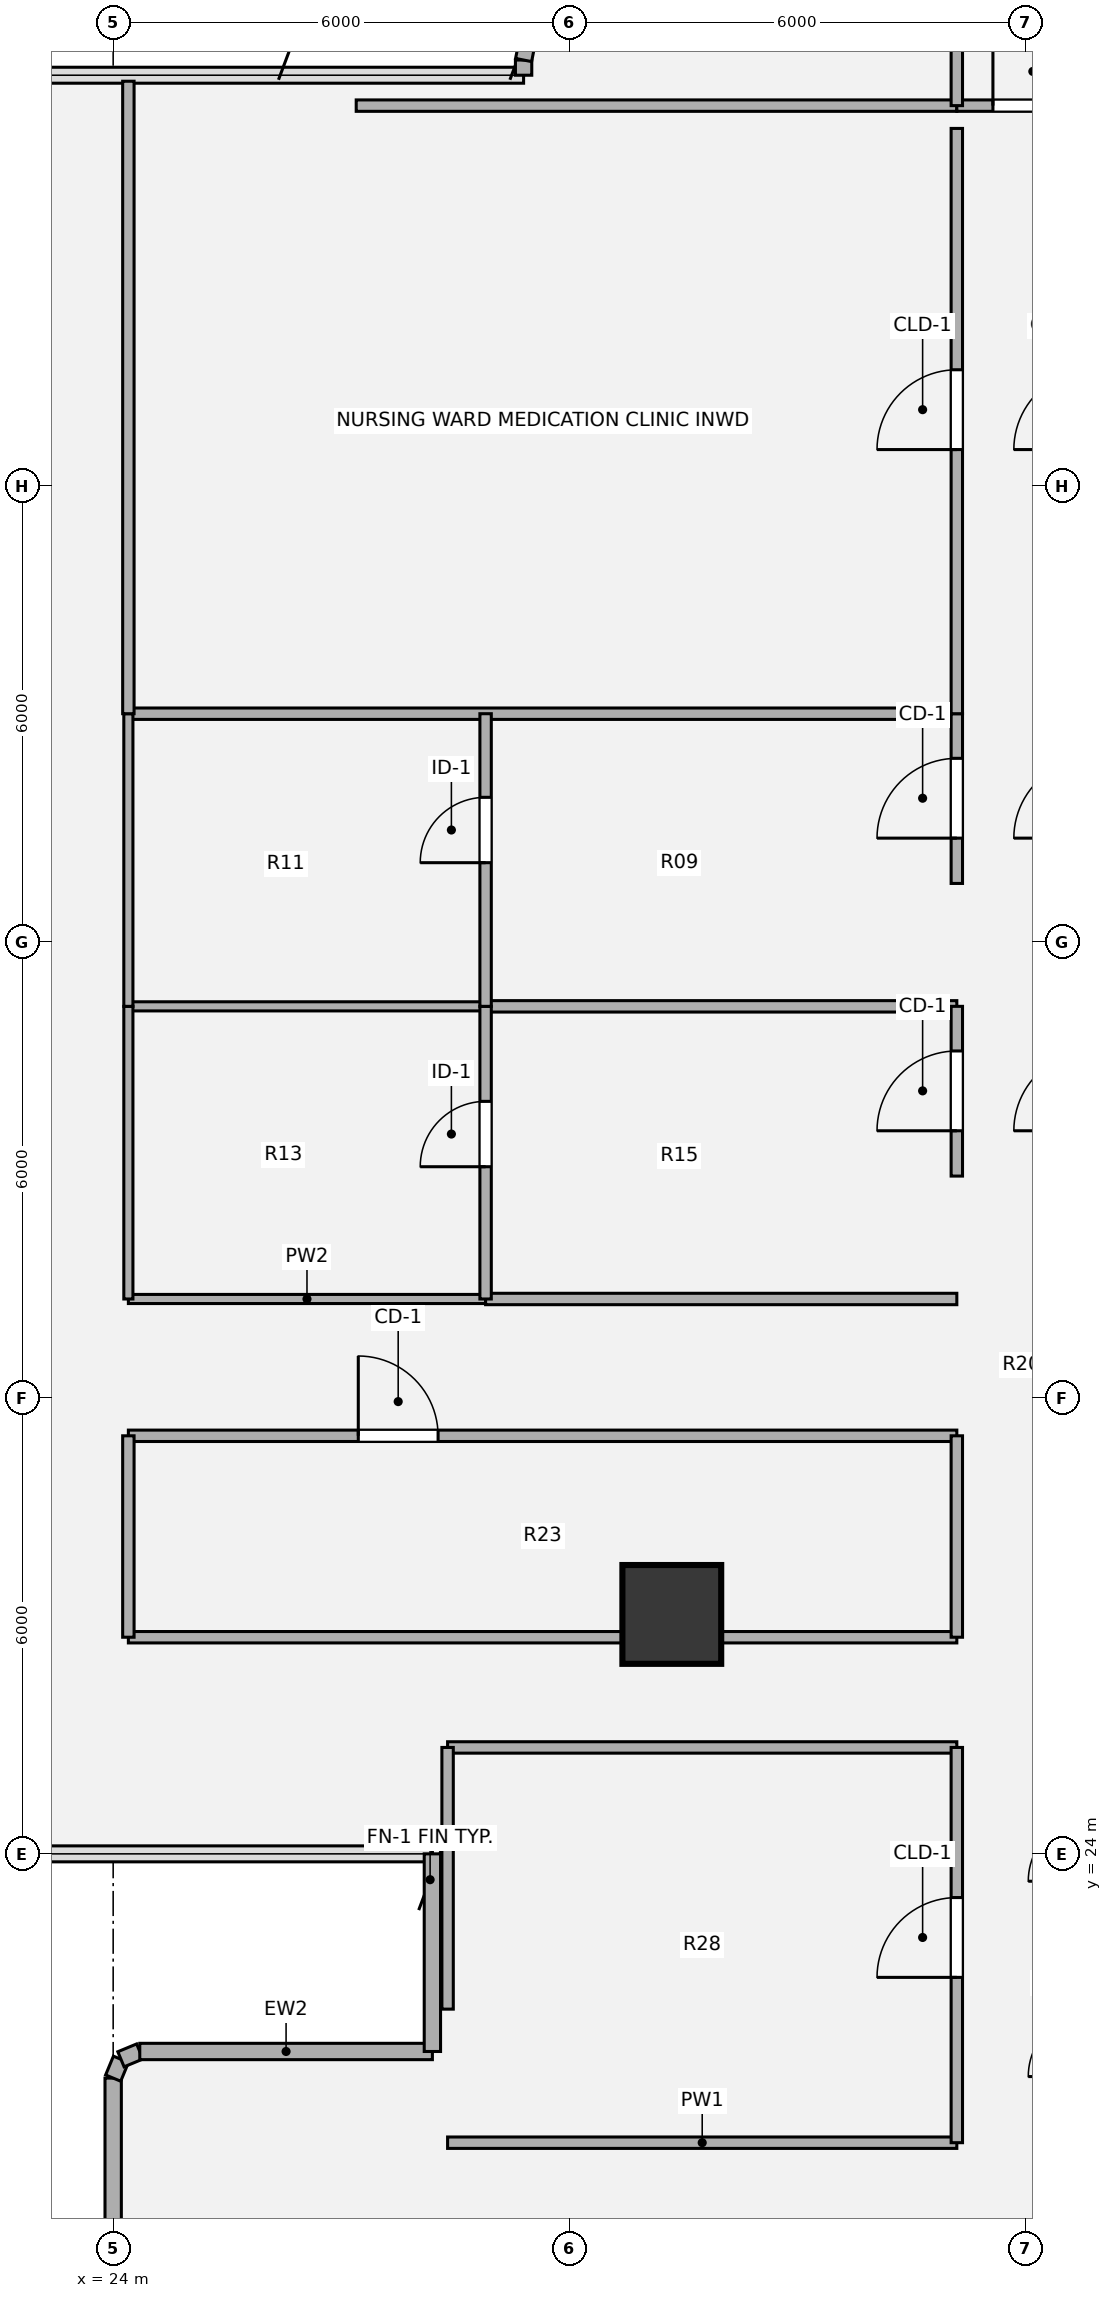
"""IFC4 building model, lengths in metres.
Left out: names, types, materials, properties, quantities, classifications, styles, units other than length and angle.
Written with IfcOpenShell. Run it as: python <this file> out.ifc"""

import sys

from ifc_helpers import new_model, si_unit, direction, frame, frame_2d, origin, origin_2d, place, context, subcontext, project, spatial, rectangle, hollow_circle, extrude, source, transform, mapped, element, fill, save


model = new_model("IFC4")
c1 = context("Model", 3, precision=1e-05, world=origin(), true_north=direction((0.0, 1.0)))
c2 = subcontext(c1, "Body", "Model", "MODEL_VIEW")
j1 = project(units=[si_unit("LENGTHUNIT", "METRE"), si_unit("PLANEANGLEUNIT", "RADIAN")], contexts=[c1])
p1 = place(None, origin())
s1 = spatial("IfcSite", under=j1, at=p1, CompositionType="ELEMENT")
p2 = place(p1, origin())
s2 = spatial("IfcBuilding", under=s1, at=p2, CompositionType="ELEMENT")
p3 = place(p2, frame((0.0, 0.0, 127.62)))
s3 = spatial("IfcBuildingStorey", under=s2, at=p3, CompositionType="ELEMENT", Elevation=127.62)
m1 = source(origin(), c2, "Body", "SweptSolid", [
    extrude(hollow_circle(Radius=0.65, WallThickness=0.045, at=origin_2d()), origin(), (0.0, 0.0, 1.0), 3.78),
])
p4 = place(p3, frame((31.35, 27.15, 0.0), z_axis=(0.0, 0.0, 1.0), x_axis=(1.0, 0.0, 0.0)))
e1 = element("IfcColumn", 1, at=p4, inside=s3, PredefinedType="COLUMN", context=c2, shape_type="MappedRepresentation", body=[
    mapped(m1, transform((0.0, 0.0, 0.0), x_axis=(1.0, 0.0, 0.0), y_axis=(0.0, 1.0, 0.0), z_axis=(0.0, 0.0, 1.0), scale=1.0)),
])
p5 = place(p3, frame((24.0, 18.43, 0.0), z_axis=(0.0, 0.0, 1.0), x_axis=(0.0, 1.0, 0.0)))
e2 = element("IfcWall", 2, at=p5, inside=s3, PredefinedType="SOLIDWALL", context=c2, shape_type="SweptSolid", body=[
    extrude(rectangle(XDim=2.62, YDim=0.215, at=frame_2d((1.31, 0.0))), origin(), (0.0, 0.0, 1.0), 3.53),
])
p6 = place(p3, frame((24.0, 21.05, 0.0), z_axis=(0.0, 0.0, 1.0), x_axis=(0.382673670509, 0.923883575944, 0.0)))
e3 = element("IfcWall", 3, at=p6, inside=s3, PredefinedType="SOLIDWALL", context=c2, shape_type="SweptSolid", body=[
    extrude(rectangle(XDim=0.268, YDim=0.215, at=frame_2d((0.134, 0.0))), origin(), (0.0, 0.0, 1.0), 3.53),
])
p7 = place(p3, frame((24.103, 21.298, 0.0), z_axis=(0.0, 0.0, 1.0), x_axis=(0.924205486139, 0.381895560841, 0.0)))
e4 = element("IfcWall", 4, at=p7, inside=s3, PredefinedType="SOLIDWALL", context=c2, shape_type="SweptSolid", body=[
    extrude(rectangle(XDim=0.268, YDim=0.215, at=frame_2d((0.134, 0.0))), origin(), (0.0, 0.0, 1.0), 3.53),
])
p8 = place(p3, frame((24.35, 21.4, 0.0), z_axis=(0.0, 0.0, 1.0), x_axis=(1.0, 0.0, 0.0)))
e5 = element("IfcWall", 5, at=p8, inside=s3, PredefinedType="SOLIDWALL", context=c2, shape_type="SweptSolid", body=[
    extrude(rectangle(XDim=3.85, YDim=0.215, at=frame_2d((1.925, 0.0))), origin(), (0.0, 0.0, 1.0), 3.53),
])
p9 = place(p3, frame((28.2, 21.4, 0.0), z_axis=(0.0, 0.0, 1.0), x_axis=(0.0, 1.0, 0.0)))
e6 = element("IfcWall", 6, at=p9, inside=s3, PredefinedType="SOLIDWALL", context=c2, shape_type="SweptSolid", body=[
    extrude(rectangle(XDim=2.6, YDim=0.215, at=frame_2d((1.3, 0.0))), origin(), (0.0, 0.0, 1.0), 3.53),
])
p10 = place(p3, frame((29.4, 47.4, 0.0), z_axis=(0.0, 0.0, 1.0), x_axis=(0.0, 1.0, 0.0)))
e7 = element("IfcWall", 7, at=p10, inside=s3, PredefinedType="SOLIDWALL", context=c2, shape_type="SweptSolid", body=[
    extrude(rectangle(XDim=0.2, YDim=0.215, at=frame_2d((0.1, 0.0))), origin(), (0.0, 0.0, 1.0), 3.53),
])
p11 = place(p3, frame((29.4, 47.6, 0.0), z_axis=(0.0, 0.0, 1.0), x_axis=(0.195127417394, 0.980777900945, 0.0)))
e8 = element("IfcWall", 8, at=p11, inside=s3, PredefinedType="SOLIDWALL", context=c2, shape_type="SweptSolid", body=[
    extrude(rectangle(XDim=1.092, YDim=0.215, at=frame_2d((0.546, 0.0))), origin(), (0.0, 0.0, 1.0), 3.53),
])
for number, where, z_axis, x_axis in (
    (9, (28.4, 20.2, 0.0), (0.0, 0.0, 1.0), (1.0, 0.0, 0.0)),
    (10, (28.4, 25.4, 0.0), (0.0, 0.0, 1.0), (1.0, 0.0, 0.0)),
):
    element("IfcWall", number, at=place(p3, frame(where, z_axis=z_axis, x_axis=x_axis)), inside=s3, PredefinedType="PARTITIONING", context=c2, shape_type="SweptSolid", body=[
        extrude(rectangle(XDim=6.7, YDim=0.15, at=frame_2d((3.35, 0.0))), origin(), (0.0, 0.0, 1.0), 3.5),
    ])
p12 = place(p3, frame((24.2, 26.85, 0.0), z_axis=(0.0, 0.0, 1.0), x_axis=(1.0, 0.0, 0.0)))
e11 = element("IfcWall", 11, at=p12, inside=s3, PredefinedType="PARTITIONING", context=c2, shape_type="SweptSolid", body=[
    extrude(rectangle(XDim=10.9, YDim=0.15, at=frame_2d((5.45, 0.0))), origin(), (0.0, 0.0, 1.0), 2.903),
])
p13 = place(p3, frame((24.2, 29.5, 0.0), z_axis=(0.0, 0.0, 1.0), x_axis=(1.0, 0.0, 0.0)))
e12 = element("IfcWall", 12, at=p13, inside=s3, PredefinedType="PARTITIONING", context=c2, shape_type="SweptSolid", body=[
    extrude(rectangle(XDim=10.9, YDim=0.15, at=frame_2d((5.45, 0.0))), origin(), (0.0, 0.0, 1.0), 2.982),
])
p14 = place(p13, frame((3.025, 0.0, 0.0)))
e13 = element("IfcOpeningElement", 13, at=p14, cuts=e12, PredefinedType="OPENING", context=c2, shape_type="SweptSolid", body=[
    extrude(rectangle(XDim=1.05, YDim=2.1, at=origin_2d()), frame((0.525, 0.085, 1.05), z_axis=(0.0, -1.0, 0.0), x_axis=(1.0, 0.0, 0.0)), (0.0, 0.0, 1.0), 0.17),
])
p15 = place(p3, frame((24.2, 31.3, 0.0), z_axis=(0.0, 0.0, 1.0), x_axis=(1.0, 0.0, 0.0)))
e14 = element("IfcWall", 14, at=p15, inside=s3, PredefinedType="PARTITIONING", context=c2, shape_type="SweptSolid", body=[
    extrude(rectangle(XDim=4.7, YDim=0.12, at=frame_2d((2.35, 0.0))), origin(), (0.0, 0.0, 1.0), 2.982),
])
p16 = place(p3, frame((28.9, 31.3, 0.0), z_axis=(0.0, 0.0, 1.0), x_axis=(1.0, 0.0, 0.0)))
e15 = element("IfcWall", 15, at=p16, inside=s3, PredefinedType="PARTITIONING", context=c2, shape_type="SweptSolid", body=[
    extrude(rectangle(XDim=6.2, YDim=0.15, at=frame_2d((3.1, 0.0))), origin(), (0.0, 0.0, 1.0), 2.982),
])
p17 = place(p3, frame((24.2, 35.15, 0.0), z_axis=(0.0, 0.0, 1.0), x_axis=(1.0, 0.0, 0.0)))
e16 = element("IfcWall", 16, at=p17, inside=s3, PredefinedType="PARTITIONING", context=c2, shape_type="SweptSolid", body=[
    extrude(rectangle(XDim=4.7, YDim=0.12, at=frame_2d((2.35, 0.0))), origin(), (0.0, 0.0, 1.0), 2.982),
])
p18 = place(p3, frame((28.9, 35.15, 0.0), z_axis=(0.0, 0.0, 1.0), x_axis=(1.0, 0.0, 0.0)))
e17 = element("IfcWall", 17, at=p18, inside=s3, PredefinedType="PARTITIONING", context=c2, shape_type="SweptSolid", body=[
    extrude(rectangle(XDim=6.2, YDim=0.15, at=frame_2d((3.1, 0.0))), origin(), (0.0, 0.0, 1.0), 2.982),
])
p19 = place(p3, frame((24.2, 39.0, 0.0), z_axis=(0.0, 0.0, 1.0), x_axis=(1.0, 0.0, 0.0)))
e18 = element("IfcWall", 18, at=p19, inside=s3, PredefinedType="PARTITIONING", context=c2, shape_type="SweptSolid", body=[
    extrude(rectangle(XDim=10.9, YDim=0.15, at=frame_2d((5.45, 0.0))), origin(), (0.0, 0.0, 1.0), 2.903),
])
p20 = place(p3, frame((27.198, 47.0, 0.0), z_axis=(0.0, 0.0, 1.0), x_axis=(1.0, 0.0, 0.0)))
e19 = element("IfcWall", 19, at=p20, inside=s3, PredefinedType="PARTITIONING", context=c2, shape_type="SweptSolid", body=[
    extrude(rectangle(XDim=7.902, YDim=0.15, at=frame_2d((3.951, 0.0))), origin(), (0.0, 0.0, 1.0), 3.308),
])
p21 = place(p3, frame((35.1, 47.0, 0.0), z_axis=(0.0, 0.0, 1.0), x_axis=(1.0, 0.0, 0.0)))
e20 = element("IfcWall", 20, at=p21, inside=s3, PredefinedType="PARTITIONING", context=c2, shape_type="SweptSolid", body=[
    extrude(rectangle(XDim=9.8, YDim=0.15, at=frame_2d((4.9, 0.0))), origin(), (0.0, 0.0, 1.0), 3.308),
])
p22 = place(p21, frame((0.475, 0.0, 0.0)))
e21 = element("IfcOpeningElement", 21, at=p22, cuts=e20, PredefinedType="OPENING", context=c2, shape_type="SweptSolid", body=[
    extrude(rectangle(XDim=1.05, YDim=2.1, at=origin_2d()), frame((0.525, 0.085, 1.05), z_axis=(0.0, -1.0, 0.0), x_axis=(1.0, 0.0, 0.0)), (0.0, 0.0, 1.0), 0.17),
])
p23 = place(p3, frame((24.2, 26.85, 0.0), z_axis=(0.0, 0.0, 1.0), x_axis=(0.0, 1.0, 0.0)))
e22 = element("IfcWall", 22, at=p23, inside=s3, PredefinedType="PARTITIONING", context=c2, shape_type="SweptSolid", body=[
    extrude(rectangle(XDim=2.65, YDim=0.15, at=frame_2d((1.325, 0.0))), origin(), (0.0, 0.0, 1.0), 3.5),
])
p24 = place(p3, frame((24.2, 31.3, 0.0), z_axis=(0.0, 0.0, 1.0), x_axis=(0.0, 1.0, 0.0)))
e23 = element("IfcWall", 23, at=p24, inside=s3, PredefinedType="PARTITIONING", context=c2, shape_type="SweptSolid", body=[
    extrude(rectangle(XDim=3.85, YDim=0.12, at=frame_2d((1.925, 0.0))), origin(), (0.0, 0.0, 1.0), 3.5),
])
p25 = place(p3, frame((24.2, 35.15, 0.0), z_axis=(0.0, 0.0, 1.0), x_axis=(0.0, 1.0, 0.0)))
e24 = element("IfcWall", 24, at=p25, inside=s3, PredefinedType="PARTITIONING", context=c2, shape_type="SweptSolid", body=[
    extrude(rectangle(XDim=3.85, YDim=0.12, at=frame_2d((1.925, 0.0))), origin(), (0.0, 0.0, 1.0), 3.5),
])
p26 = place(p3, frame((24.2, 39.0, 0.0), z_axis=(0.0, 0.0, 1.0), x_axis=(0.0, 1.0, 0.0)))
e25 = element("IfcWall", 25, at=p26, inside=s3, PredefinedType="PARTITIONING", context=c2, shape_type="SweptSolid", body=[
    extrude(rectangle(XDim=8.321, YDim=0.15, at=frame_2d((4.16, 0.0))), origin(), (0.0, 0.0, 1.0), 3.5),
])
p27 = place(p3, frame((28.4, 21.957, 0.0), z_axis=(0.0, 0.0, 1.0), x_axis=(0.0, 1.0, 0.0)))
e26 = element("IfcWall", 26, at=p27, inside=s3, PredefinedType="PARTITIONING", context=c2, shape_type="SweptSolid", body=[
    extrude(rectangle(XDim=3.443, YDim=0.15, at=frame_2d((1.721, 0.0))), origin(), (0.0, 0.0, 1.0), 3.5),
])
p28 = place(p3, frame((28.9, 31.3, 0.0), z_axis=(0.0, 0.0, 1.0), x_axis=(0.0, 1.0, 0.0)))
e27 = element("IfcWall", 27, at=p28, inside=s3, PredefinedType="PARTITIONING", context=c2, shape_type="SweptSolid", body=[
    extrude(rectangle(XDim=3.85, YDim=0.15, at=frame_2d((1.925, 0.0))), origin(), (0.0, 0.0, 1.0), 3.5),
])
p29 = place(p28, frame((1.74, 0.0, 0.0)))
e28 = element("IfcOpeningElement", 28, at=p29, cuts=e27, PredefinedType="OPENING", context=c2, shape_type="SweptSolid", body=[
    extrude(rectangle(XDim=0.86, YDim=2.1, at=origin_2d()), frame((0.43, 0.085, 1.05), z_axis=(0.0, -1.0, 0.0), x_axis=(1.0, 0.0, 0.0)), (0.0, 0.0, 1.0), 0.17),
])
p30 = place(p3, frame((28.9, 35.15, 0.0), z_axis=(0.0, 0.0, 1.0), x_axis=(0.0, 1.0, 0.0)))
e29 = element("IfcWall", 29, at=p30, inside=s3, PredefinedType="PARTITIONING", context=c2, shape_type="SweptSolid", body=[
    extrude(rectangle(XDim=3.85, YDim=0.15, at=frame_2d((1.925, 0.0))), origin(), (0.0, 0.0, 1.0), 3.5),
])
p31 = place(p30, frame((1.89, 0.0, 0.0)))
e30 = element("IfcOpeningElement", 30, at=p31, cuts=e29, PredefinedType="OPENING", context=c2, shape_type="SweptSolid", body=[
    extrude(rectangle(XDim=0.86, YDim=2.1, at=origin_2d()), frame((0.43, 0.085, 1.05), z_axis=(0.0, -1.0, 0.0), x_axis=(1.0, 0.0, 0.0)), (0.0, 0.0, 1.0), 0.17),
])
p32 = place(p3, frame((35.1, 20.2, 0.0), z_axis=(0.0, 0.0, 1.0), x_axis=(0.0, 1.0, 0.0)))
e31 = element("IfcWall", 31, at=p32, inside=s3, PredefinedType="PARTITIONING", context=c2, shape_type="SweptSolid", body=[
    extrude(rectangle(XDim=5.2, YDim=0.15, at=frame_2d((2.6, 0.0))), origin(), (0.0, 0.0, 1.0), 3.5),
])
p33 = place(p32, frame((2.175, 0.0, 0.0)))
e32 = element("IfcOpeningElement", 32, at=p33, cuts=e31, PredefinedType="OPENING", context=c2, shape_type="SweptSolid", body=[
    extrude(rectangle(XDim=1.05, YDim=2.1, at=origin_2d()), frame((0.525, 0.085, 1.05), z_axis=(0.0, -1.0, 0.0), x_axis=(1.0, 0.0, 0.0)), (0.0, 0.0, 1.0), 0.17),
])
p34 = place(p3, frame((35.1, 26.85, 0.0), z_axis=(0.0, 0.0, 1.0), x_axis=(0.0, 1.0, 0.0)))
e33 = element("IfcWall", 33, at=p34, inside=s3, PredefinedType="PARTITIONING", context=c2, shape_type="SweptSolid", body=[
    extrude(rectangle(XDim=2.65, YDim=0.15, at=frame_2d((1.325, 0.0))), origin(), (0.0, 0.0, 1.0), 3.5),
])
p35 = place(p3, frame((35.1, 32.917, 0.0), z_axis=(0.0, 0.0, 1.0), x_axis=(0.0, 1.0, 0.0)))
e34 = element("IfcWall", 34, at=p35, inside=s3, PredefinedType="PARTITIONING", context=c2, shape_type="SweptSolid", body=[
    extrude(rectangle(XDim=2.233, YDim=0.15, at=frame_2d((1.116, 0.0))), origin(), (0.0, 0.0, 1.0), 3.5),
])
p36 = place(p35, frame((0.596, 0.0, 0.0)))
e35 = element("IfcOpeningElement", 35, at=p36, cuts=e34, PredefinedType="OPENING", context=c2, shape_type="SweptSolid", body=[
    extrude(rectangle(XDim=1.05, YDim=2.1, at=origin_2d()), frame((0.525, 0.085, 1.05), z_axis=(0.0, -1.0, 0.0), x_axis=(1.0, 0.0, 0.0)), (0.0, 0.0, 1.0), 0.17),
])
p37 = place(p3, frame((35.1, 36.767, 0.0), z_axis=(0.0, 0.0, 1.0), x_axis=(0.0, 1.0, 0.0)))
e36 = element("IfcWall", 36, at=p37, inside=s3, PredefinedType="PARTITIONING", context=c2, shape_type="SweptSolid", body=[
    extrude(rectangle(XDim=2.233, YDim=0.15, at=frame_2d((1.116, 0.0))), origin(), (0.0, 0.0, 1.0), 3.5),
])
p38 = place(p37, frame((0.596, 0.0, 0.0)))
e37 = element("IfcOpeningElement", 37, at=p38, cuts=e36, PredefinedType="OPENING", context=c2, shape_type="SweptSolid", body=[
    extrude(rectangle(XDim=1.05, YDim=2.1, at=origin_2d()), frame((0.525, 0.085, 1.05), z_axis=(0.0, -1.0, 0.0), x_axis=(1.0, 0.0, 0.0)), (0.0, 0.0, 1.0), 0.17),
])
p39 = place(p3, frame((35.1, 39.0, 0.0), z_axis=(0.0, 0.0, 1.0), x_axis=(0.0, 1.0, 0.0)))
e38 = element("IfcWall", 38, at=p39, inside=s3, PredefinedType="PARTITIONING", context=c2, shape_type="SweptSolid", body=[
    extrude(rectangle(XDim=7.7, YDim=0.15, at=frame_2d((3.85, 0.0))), origin(), (0.0, 0.0, 1.0), 3.5),
])
p40 = place(p39, frame((3.475, 0.0, 0.0)))
e39 = element("IfcOpeningElement", 39, at=p40, cuts=e38, PredefinedType="OPENING", context=c2, shape_type="SweptSolid", body=[
    extrude(rectangle(XDim=1.05, YDim=2.1, at=origin_2d()), frame((0.525, 0.085, 1.05), z_axis=(0.0, -1.0, 0.0), x_axis=(1.0, 0.0, 0.0)), (0.0, 0.0, 1.0), 0.17),
])
p41 = place(p3, frame((35.1, 47.0, 0.0), z_axis=(0.0, 0.0, 1.0), x_axis=(0.0, 1.0, 0.0)))
e40 = element("IfcWall", 40, at=p41, inside=s3, PredefinedType="PARTITIONING", context=c2, shape_type="SweptSolid", body=[
    extrude(rectangle(XDim=3.32, YDim=0.15, at=frame_2d((1.66, 0.0))), origin(), (0.0, 0.0, 1.0), 3.5),
])
p42 = place(p41, frame((1.14, 0.0, 0.0)))
e41 = element("IfcOpeningElement", 41, at=p42, cuts=e40, PredefinedType="OPENING", context=c2, shape_type="SweptSolid", body=[
    extrude(rectangle(XDim=0.86, YDim=2.1, at=origin_2d()), frame((0.43, 0.085, 1.05), z_axis=(0.0, -1.0, 0.0), x_axis=(1.0, 0.0, 0.0)), (0.0, 0.0, 1.0), 0.17),
])
m2 = source(origin(), c2, "Body", "SweptSolid", [
    extrude(rectangle(XDim=1.05, YDim=2.1, at=origin_2d()), frame((0.525, 0.025, 1.05), z_axis=(0.0, -1.0, 0.0), x_axis=(1.0, 0.0, 0.0)), (0.0, 0.0, 1.0), 0.05),
])
p43 = place(p14, origin())
e42 = element("IfcDoor", 42, at=p43, inside=s3, OperationType="SINGLE_SWING_LEFT", PredefinedType="DOOR", context=c2, shape_type="MappedRepresentation", body=[
    mapped(m2, transform((0.0, 0.0, 0.0), x_axis=(1.0, 0.0, 0.0), y_axis=(0.0, 1.0, 0.0), z_axis=(0.0, 0.0, 1.0), scale=1.0)),
])
fill(e13, e42)
m3 = source(origin(), c2, "Body", "SweptSolid", [
    extrude(rectangle(XDim=1.05, YDim=2.1, at=origin_2d()), frame((0.525, 0.025, 1.05), z_axis=(0.0, -1.0, 0.0), x_axis=(1.0, 0.0, 0.0)), (0.0, 0.0, 1.0), 0.05),
])
p44 = place(p22, origin())
e43 = element("IfcDoor", 43, at=p44, inside=s3, OperationType="SINGLE_SWING_LEFT", PredefinedType="DOOR", context=c2, shape_type="MappedRepresentation", body=[
    mapped(m3, transform((0.0, 0.0, 0.0), x_axis=(1.0, 0.0, 0.0), y_axis=(0.0, 1.0, 0.0), z_axis=(0.0, 0.0, 1.0), scale=1.0)),
])
fill(e21, e43)
m4 = source(origin(), c2, "Body", "SweptSolid", [
    extrude(rectangle(XDim=0.86, YDim=2.1, at=origin_2d()), frame((0.43, 0.025, 1.05), z_axis=(0.0, -1.0, 0.0), x_axis=(1.0, 0.0, 0.0)), (0.0, 0.0, 1.0), 0.05),
])
p45 = place(p29, origin())
e44 = element("IfcDoor", 44, at=p45, inside=s3, OperationType="SINGLE_SWING_LEFT", PredefinedType="DOOR", context=c2, shape_type="MappedRepresentation", body=[
    mapped(m4, transform((0.0, 0.0, 0.0), x_axis=(1.0, 0.0, 0.0), y_axis=(0.0, 1.0, 0.0), z_axis=(0.0, 0.0, 1.0), scale=1.0)),
])
fill(e28, e44)
p46 = place(p31, origin())
e45 = element("IfcDoor", 45, at=p46, inside=s3, OperationType="SINGLE_SWING_LEFT", PredefinedType="DOOR", context=c2, shape_type="MappedRepresentation", body=[
    mapped(m4, transform((0.0, 0.0, 0.0), x_axis=(1.0, 0.0, 0.0), y_axis=(0.0, 1.0, 0.0), z_axis=(0.0, 0.0, 1.0), scale=1.0)),
])
fill(e30, e45)
p47 = place(p33, origin())
e46 = element("IfcDoor", 46, at=p47, inside=s3, OperationType="SINGLE_SWING_LEFT", PredefinedType="DOOR", context=c2, shape_type="MappedRepresentation", body=[
    mapped(m3, transform((0.0, 0.0, 0.0), x_axis=(1.0, 0.0, 0.0), y_axis=(0.0, 1.0, 0.0), z_axis=(0.0, 0.0, 1.0), scale=1.0)),
])
fill(e32, e46)
p48 = place(p36, origin())
e47 = element("IfcDoor", 47, at=p48, inside=s3, OperationType="SINGLE_SWING_LEFT", PredefinedType="DOOR", context=c2, shape_type="MappedRepresentation", body=[
    mapped(m2, transform((0.0, 0.0, 0.0), x_axis=(1.0, 0.0, 0.0), y_axis=(0.0, 1.0, 0.0), z_axis=(0.0, 0.0, 1.0), scale=1.0)),
])
fill(e35, e47)
p49 = place(p38, origin())
e48 = element("IfcDoor", 48, at=p49, inside=s3, OperationType="SINGLE_SWING_LEFT", PredefinedType="DOOR", context=c2, shape_type="MappedRepresentation", body=[
    mapped(m2, transform((0.0, 0.0, 0.0), x_axis=(1.0, 0.0, 0.0), y_axis=(0.0, 1.0, 0.0), z_axis=(0.0, 0.0, 1.0), scale=1.0)),
])
fill(e37, e48)
p50 = place(p40, origin())
e49 = element("IfcDoor", 49, at=p50, inside=s3, OperationType="SINGLE_SWING_LEFT", PredefinedType="DOOR", context=c2, shape_type="MappedRepresentation", body=[
    mapped(m3, transform((0.0, 0.0, 0.0), x_axis=(1.0, 0.0, 0.0), y_axis=(0.0, 1.0, 0.0), z_axis=(0.0, 0.0, 1.0), scale=1.0)),
])
fill(e39, e49)
save(model, sys.argv[1])
